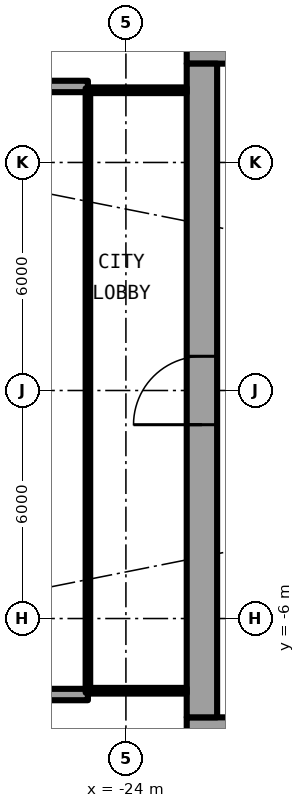
"""IFC4 building model, lengths in metres.
Left out: names, types, materials, properties, quantities, classifications, styles, units other than length and angle.
Written with IfcOpenShell. Run it as: python <this file> out.ifc"""

import sys

from ifc_helpers import new_model, si_unit, direction, frame, frame_2d, origin, place, context, subcontext, project, spatial, rectangle, extrude, element, fill, save


model = new_model("IFC4")
c1 = context("Model", 3, precision=1e-05, world=origin(), true_north=direction((0.0, 1.0)))
c2 = subcontext(c1, "Body", "Model", "MODEL_VIEW")
j1 = project(units=[si_unit("LENGTHUNIT", "METRE"), si_unit("PLANEANGLEUNIT", "RADIAN")], contexts=[c1])
p1 = place(None, origin())
s1 = spatial("IfcSite", under=j1, at=p1, CompositionType="ELEMENT")
p2 = place(p1, origin())
s2 = spatial("IfcBuilding", under=s1, at=p2, CompositionType="ELEMENT")
p3 = place(p2, frame((0.0, 0.0, 35.0)))
s3 = spatial("IfcBuildingStorey", under=s2, at=p3, CompositionType="ELEMENT", Elevation=35.0)
for number, where, z_axis, x_axis in (
    (1, (-25.0, 8.0, 0.0), (0.0, 0.0, 1.0), (-1.0, 0.0, 0.0)),
    (2, (-25.0, -8.0, 0.0), (0.0, 0.0, 1.0), (-1.0, 0.0, 0.0)),
):
    element("IfcWall", number, at=place(p3, frame(where, z_axis=z_axis, x_axis=x_axis)), inside=s3, PredefinedType="SOLIDWALL", context=c2, shape_type="SweptSolid", body=[
        extrude(rectangle(XDim=2.667, YDim=0.3, at=frame_2d((1.333, 0.0))), origin(), (0.0, 0.0, 1.0), 2.7),
    ])
p4 = place(p3, frame((-22.4, -9.0, 0.0), z_axis=(0.0, 0.0, 1.0), x_axis=(1.0, 0.0, 0.0)))
e3 = element("IfcWall", 3, at=p4, inside=s3, PredefinedType="SHEAR", context=c2, shape_type="SweptSolid", body=[
    extrude(rectangle(XDim=14.2, YDim=0.8, at=frame_2d((7.1, 0.0))), origin(), (0.0, 0.0, 1.0), 3.05),
])
p5 = place(p4, frame((1.325, 0.0, 0.0)))
e4 = element("IfcOpeningElement", 4, at=p5, cuts=e3, PredefinedType="OPENING", context=c2, shape_type="SweptSolid", body=[
    extrude(rectangle(XDim=1.2, YDim=2.3, at=frame_2d((0.6, 1.15))), frame((0.0, 0.41, 0.0), z_axis=(0.0, -1.0, 0.0), x_axis=(1.0, 0.0, 0.0)), (0.0, 0.0, 1.0), 0.82),
])
p6 = place(p3, frame((-8.2, 9.0, 0.0), z_axis=(0.0, 0.0, 1.0), x_axis=(-1.0, 0.0, 0.0)))
e5 = element("IfcWall", 5, at=p6, inside=s3, PredefinedType="SHEAR", context=c2, shape_type="SweptSolid", body=[
    extrude(rectangle(XDim=14.2, YDim=0.8, at=frame_2d((7.1, 0.0))), origin(), (0.0, 0.0, 1.0), 3.05),
])
p7 = place(p6, frame((11.675, 0.0, 0.0)))
e6 = element("IfcOpeningElement", 6, at=p7, cuts=e5, PredefinedType="OPENING", context=c2, shape_type="SweptSolid", body=[
    extrude(rectangle(XDim=1.2, YDim=2.3, at=frame_2d((0.6, 1.15))), frame((0.0, 0.41, 0.0), z_axis=(0.0, -1.0, 0.0), x_axis=(1.0, 0.0, 0.0)), (0.0, 0.0, 1.0), 0.82),
])
p8 = place(p3, frame((-22.0, -8.6, 0.0), z_axis=(0.0, 0.0, 1.0), x_axis=(0.0, 1.0, 0.0)))
e7 = element("IfcWall", 7, at=p8, inside=s3, PredefinedType="SHEAR", context=c2, shape_type="SweptSolid", body=[
    extrude(rectangle(XDim=17.2, YDim=0.8, at=frame_2d((8.6, 0.0))), origin(), (0.0, 0.0, 1.0), 3.05),
])
p9 = place(p8, frame((7.7, 0.0, 0.0)))
e8 = element("IfcOpeningElement", 8, at=p9, cuts=e7, PredefinedType="OPENING", context=c2, shape_type="SweptSolid", body=[
    extrude(rectangle(XDim=1.8, YDim=2.3, at=frame_2d((0.9, 1.15))), frame((0.0, 0.41, 0.0), z_axis=(0.0, -1.0, 0.0), x_axis=(1.0, 0.0, 0.0)), (0.0, 0.0, 1.0), 0.82),
])
for number, where, z_axis, x_axis in (
    (9, (-22.4, 7.9, 0.0), (0.0, 0.0, 1.0), (-1.0, 0.0, 0.0)),
    (10, (-22.4, -7.9, 0.0), (0.0, 0.0, 1.0), (-1.0, 0.0, 0.0)),
):
    element("IfcWall", number, at=place(p3, frame(where, z_axis=z_axis, x_axis=x_axis)), inside=s3, PredefinedType="PARTITIONING", context=c2, shape_type="SweptSolid", body=[
        extrude(rectangle(XDim=2.54, YDim=0.15, at=frame_2d((1.27, 0.0))), origin(), (0.0, 0.0, 1.0), 2.7),
    ])
p10 = place(p3, frame((-25.0, 7.95, 0.0), z_axis=(0.0, 0.0, 1.0), x_axis=(0.0, -1.0, 0.0)))
e11 = element("IfcWall", 11, at=p10, inside=s3, PredefinedType="PARTITIONING", context=c2, shape_type="SweptSolid", body=[
    extrude(rectangle(XDim=15.9, YDim=0.12, at=frame_2d((7.95, 0.0))), origin(), (0.0, 0.0, 1.0), 2.7),
])
p11 = place(p10, frame((0.95, 0.0, 0.1)))
e12 = element("IfcOpeningElement", 12, at=p11, cuts=e11, PredefinedType="OPENING", context=c2, shape_type="SweptSolid", body=[
    extrude(rectangle(XDim=14.0, YDim=2.35, at=frame_2d((7.0, 1.175))), frame((0.0, 0.07, 0.0), z_axis=(0.0, -1.0, 0.0), x_axis=(1.0, 0.0, 0.0)), (0.0, 0.0, 1.0), 0.14),
])
p12 = place(p9, origin())
e13 = element("IfcDoor", 13, at=p12, inside=s3, OperationType="SINGLE_SWING_LEFT", PredefinedType="DOOR", context=c2, shape_type="SweptSolid", body=[
    extrude(rectangle(XDim=1.8, YDim=2.3, at=frame_2d((0.9, 1.15))), frame((0.0, 0.025, 0.0), z_axis=(0.0, -1.0, 0.0), x_axis=(1.0, 0.0, 0.0)), (0.0, 0.0, 1.0), 0.05),
])
fill(e8, e13)
p13 = place(p11, origin())
e14 = element("IfcWindow", 14, at=p13, inside=s3, PartitioningType="SINGLE_PANEL", PredefinedType="WINDOW", context=c2, shape_type="SweptSolid", body=[
    extrude(rectangle(XDim=14.0, YDim=2.35, at=frame_2d((7.0, 1.175))), frame((0.0, 0.03, 0.0), z_axis=(0.0, -1.0, 0.0), x_axis=(1.0, 0.0, 0.0)), (0.0, 0.0, 1.0), 0.06),
])
fill(e12, e14)
save(model, sys.argv[1])
